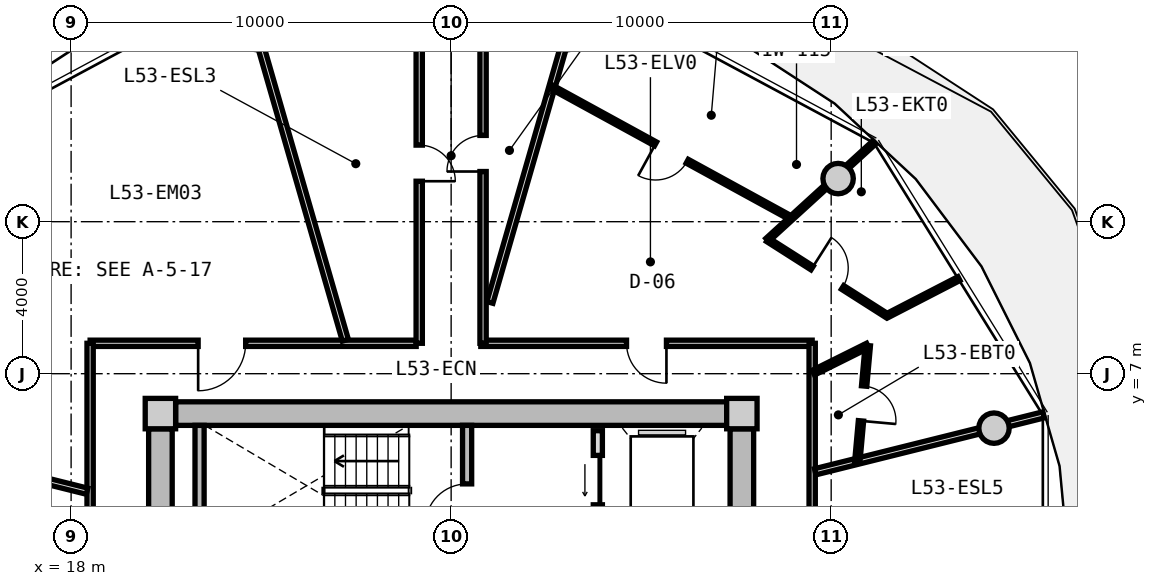
"""IFC4 building model, lengths in metres.
Left out: names, types, materials, properties, quantities, classifications, styles, units other than length and angle.
Written with IfcOpenShell. Run it as: python <this file> out.ifc"""

import sys

from ifc_helpers import new_model, si_unit, direction, frame, frame_2d, origin, origin_2d, place, context, subcontext, project, spatial, rectangle, circle, extrude, source, transform, mapped, element, fill, save


model = new_model("IFC4")
c1 = context("Model", 3, precision=1e-05, world=origin(), true_north=direction((0.0, 1.0)))
c2 = subcontext(c1, "Body", "Model", "MODEL_VIEW")
j1 = project(units=[si_unit("LENGTHUNIT", "METRE"), si_unit("PLANEANGLEUNIT", "RADIAN")], contexts=[c1])
p1 = place(None, origin())
s1 = spatial("IfcSite", under=j1, at=p1, CompositionType="ELEMENT")
p2 = place(p1, origin())
s2 = spatial("IfcBuilding", under=s1, at=p2, CompositionType="ELEMENT")
p3 = place(p2, frame((0.0, 0.0, 170.9)))
s3 = spatial("IfcBuildingStorey", under=s2, at=p3, CompositionType="ELEMENT", Elevation=170.9)
m1 = source(origin(), c2, "Body", "SweptSolid", [
    extrude(rectangle(XDim=0.8, YDim=0.8, at=origin_2d()), origin(), (0.0, 0.0, 1.0), 3.05),
])
for number, where, z_axis, x_axis in (
    (1, (35.65, 5.95, 0.0), (0.0, 0.0, 1.0), (1.0, 0.0, 0.0)),
    (2, (20.35, 5.95, 0.0), (0.0, 0.0, 1.0), (1.0, 0.0, 0.0)),
):
    element("IfcColumn", number, at=place(p3, frame(where, z_axis=z_axis, x_axis=x_axis)), inside=s3, PredefinedType="COLUMN", context=c2, shape_type="MappedRepresentation", body=[
        mapped(m1, transform((0.0, 0.0, 0.0), x_axis=(1.0, 0.0, 0.0), y_axis=(0.0, 1.0, 0.0), z_axis=(0.0, 0.0, 1.0), scale=1.0)),
    ])
m2 = source(origin(), c2, "Body", "SweptSolid", [
    extrude(rectangle(XDim=14.5, YDim=0.62, at=frame_2d((7.25, 0.0))), origin(), (0.0, 0.0, 1.0), 2.81),
])
p4 = place(p3, frame((20.75, 5.95, 0.0), z_axis=(0.0, 0.0, 1.0), x_axis=(1.0, 0.0, 0.0)))
e3 = element("IfcWall", 3, at=p4, inside=s3, PredefinedType="SHEAR", context=c2, shape_type="MappedRepresentation", body=[
    mapped(m2, transform((0.0, 0.0, 0.0), x_axis=(1.0, 0.0, 0.0), y_axis=(0.0, 1.0, 0.0), z_axis=(0.0, 0.0, 1.0), scale=1.0)),
])
m3 = source(origin(), c2, "Body", "SweptSolid", [
    extrude(rectangle(XDim=11.1, YDim=0.62, at=frame_2d((5.55, 0.0))), origin(), (0.0, 0.0, 1.0), 2.81),
])
p5 = place(p3, frame((20.35, -5.55, 0.0), z_axis=(0.0, 0.0, 1.0), x_axis=(0.0, 1.0, 0.0)))
e4 = element("IfcWall", 4, at=p5, inside=s3, PredefinedType="SHEAR", context=c2, shape_type="MappedRepresentation", body=[
    mapped(m3, transform((0.0, 0.0, 0.0), x_axis=(1.0, 0.0, 0.0), y_axis=(0.0, 1.0, 0.0), z_axis=(0.0, 0.0, 1.0), scale=1.0)),
])
p6 = place(p5, frame((3.8, 0.0, 0.0)))
e5 = element("IfcOpeningElement", 5, at=p6, cuts=e4, PredefinedType="OPENING", context=c2, shape_type="SweptSolid", body=[
    extrude(rectangle(XDim=1.2, YDim=2.15, at=frame_2d((0.6, 1.075))), frame((0.0, 0.32, 0.0), z_axis=(0.0, -1.0, 0.0), x_axis=(1.0, 0.0, 0.0)), (0.0, 0.0, 1.0), 0.64),
])
p7 = place(p3, frame((35.65, 5.55, 0.0), z_axis=(0.0, 0.0, 1.0), x_axis=(0.0, -1.0, 0.0)))
e6 = element("IfcWall", 6, at=p7, inside=s3, PredefinedType="SHEAR", context=c2, shape_type="MappedRepresentation", body=[
    mapped(m3, transform((0.0, 0.0, 0.0), x_axis=(1.0, 0.0, 0.0), y_axis=(0.0, 1.0, 0.0), z_axis=(0.0, 0.0, 1.0), scale=1.0)),
])
p8 = place(p7, frame((5.65, 0.0, 0.0)))
e7 = element("IfcOpeningElement", 7, at=p8, cuts=e6, PredefinedType="OPENING", context=c2, shape_type="SweptSolid", body=[
    extrude(rectangle(XDim=1.2, YDim=2.15, at=frame_2d((0.6, 1.075))), frame((0.0, 0.32, 0.0), z_axis=(0.0, -1.0, 0.0), x_axis=(1.0, 0.0, 0.0)), (0.0, 0.0, 1.0), 0.64),
])
p9 = place(p7, frame((9.3, 0.0, 0.0)))
e8 = element("IfcOpeningElement", 8, at=p9, cuts=e6, PredefinedType="OPENING", context=c2, shape_type="SweptSolid", body=[
    extrude(rectangle(XDim=1.0, YDim=2.1, at=frame_2d((0.5, 1.05))), frame((0.0, 0.32, 0.0), z_axis=(0.0, -1.0, 0.0), x_axis=(1.0, 0.0, 0.0)), (0.0, 0.0, 1.0), 0.64),
])
m4 = source(origin(), c2, "Body", "SweptSolid", [
    extrude(circle(Radius=0.4, at=origin_2d()), origin(), (0.0, 0.0, 1.0), 3.05),
])
for number, where, z_axis, x_axis in (
    (9, (42.285, 5.567, 0.0), (0.0, 0.0, 1.0), (1.0, 0.0, 0.0)),
    (10, (38.183, 12.135, 0.0), (0.0, 0.0, 1.0), (1.0, 0.0, 0.0)),
):
    element("IfcColumn", number, at=place(p3, frame(where, z_axis=z_axis, x_axis=x_axis)), inside=s3, PredefinedType="COLUMN", context=c2, shape_type="MappedRepresentation", body=[
        mapped(m4, transform((0.0, 0.0, 0.0), x_axis=(1.0, 0.0, 0.0), y_axis=(0.0, 1.0, 0.0), z_axis=(0.0, 0.0, 1.0), scale=1.0)),
    ])
m5 = source(origin(), c2, "Body", "SweptSolid", [
    extrude(rectangle(XDim=3.19, YDim=0.24, at=frame_2d((1.595, 0.0))), origin(), (0.0, 0.0, 1.0), 2.81),
])
p10 = place(p3, frame((21.38, 2.45, 0.0), z_axis=(0.0, 0.0, 1.0), x_axis=(0.0, 1.0, 0.0)))
e11 = element("IfcWall", 11, at=p10, inside=s3, PredefinedType="PARTITIONING", context=c2, shape_type="MappedRepresentation", body=[
    mapped(m5, transform((0.0, 0.0, 0.0), x_axis=(1.0, 0.0, 0.0), y_axis=(0.0, 1.0, 0.0), z_axis=(0.0, 0.0, 1.0), scale=1.0)),
])
p11 = place(p3, frame((28.42, 2.45, 0.0), z_axis=(0.0, 0.0, 1.0), x_axis=(0.0, 1.0, 0.0)))
e12 = element("IfcWall", 12, at=p11, inside=s3, PredefinedType="PARTITIONING", context=c2, shape_type="MappedRepresentation", body=[
    mapped(m5, transform((0.0, 0.0, 0.0), x_axis=(1.0, 0.0, 0.0), y_axis=(0.0, 1.0, 0.0), z_axis=(0.0, 0.0, 1.0), scale=1.0)),
])
p12 = place(p11, frame((0.55, 0.0, 0.0)))
e13 = element("IfcOpeningElement", 13, at=p12, cuts=e12, PredefinedType="OPENING", context=c2, shape_type="SweptSolid", body=[
    extrude(rectangle(XDim=1.1, YDim=2.15, at=frame_2d((0.55, 1.075))), frame((0.0, 0.13, 0.0), z_axis=(0.0, -1.0, 0.0), x_axis=(1.0, 0.0, 0.0)), (0.0, 0.0, 1.0), 0.26),
])
m6 = source(origin(), c2, "Body", "SweptSolid", [
    extrude(rectangle(XDim=5.0, YDim=0.24, at=frame_2d((2.5, 0.0))), origin(), (0.0, 0.0, 1.0), 2.795),
])
p13 = place(p3, frame((31.86, 0.5, 0.0), z_axis=(0.0, 0.0, 1.0), x_axis=(0.0, 1.0, 0.0)))
e14 = element("IfcWall", 14, at=p13, inside=s3, PredefinedType="PARTITIONING", context=c2, shape_type="MappedRepresentation", body=[
    mapped(m6, transform((0.0, 0.0, 0.0), x_axis=(1.0, 0.0, 0.0), y_axis=(0.0, 1.0, 0.0), z_axis=(0.0, 0.0, 1.0), scale=1.0)),
])
p14 = place(p13, frame((3.05, 0.0, 0.0)))
e15 = element("IfcOpeningElement", 15, at=p14, cuts=e14, PredefinedType="OPENING", context=c2, shape_type="SweptSolid", body=[
    extrude(rectangle(XDim=1.3, YDim=2.2, at=frame_2d((0.65, 1.1))), frame((0.0, 0.13, 0.0), z_axis=(0.0, -1.0, 0.0), x_axis=(1.0, 0.0, 0.0)), (0.0, 0.0, 1.0), 0.26),
])
p15 = place(p13, frame((0.55, 0.0, 0.0)))
e16 = element("IfcOpeningElement", 16, at=p15, cuts=e14, PredefinedType="OPENING", context=c2, shape_type="SweptSolid", body=[
    extrude(rectangle(XDim=1.3, YDim=2.2, at=frame_2d((0.65, 1.1))), frame((0.0, 0.13, 0.0), z_axis=(0.0, -1.0, 0.0), x_axis=(1.0, 0.0, 0.0)), (0.0, 0.0, 1.0), 0.26),
])
m7 = source(origin(), c2, "Body", "SweptSolid", [
    extrude(rectangle(XDim=8.58, YDim=0.165, at=frame_2d((4.29, 0.0))), origin(), (0.0, 0.0, 1.0), 2.795),
])
p16 = place(p3, frame((18.5, 7.8, 0.0), z_axis=(0.0, 0.0, 1.0), x_axis=(1.0, 0.0, 0.0)))
e17 = element("IfcWall", 17, at=p16, inside=s3, PredefinedType="PARTITIONING", context=c2, shape_type="MappedRepresentation", body=[
    mapped(m7, transform((0.0, 0.0, 0.0), x_axis=(1.0, 0.0, 0.0), y_axis=(0.0, 1.0, 0.0), z_axis=(0.0, 0.0, 1.0), scale=1.0)),
])
p17 = place(p16, frame((2.843, 0.0, 0.0)))
e18 = element("IfcOpeningElement", 18, at=p17, cuts=e17, PredefinedType="OPENING", context=c2, shape_type="SweptSolid", body=[
    extrude(rectangle(XDim=1.25, YDim=2.2, at=frame_2d((0.625, 1.1))), frame((0.0, 0.093, 0.0), z_axis=(0.0, -1.0, 0.0), x_axis=(1.0, 0.0, 0.0)), (0.0, 0.0, 1.0), 0.185),
])
m8 = source(origin(), c2, "Body", "SweptSolid", [
    extrude(rectangle(XDim=8.719, YDim=0.165, at=frame_2d((4.36, 0.0))), origin(), (0.0, 0.0, 1.0), 2.795),
])
p18 = place(p3, frame((28.781, 7.8, 0.0), z_axis=(0.0, 0.0, 1.0), x_axis=(1.0, 0.0, 0.0)))
e19 = element("IfcWall", 19, at=p18, inside=s3, PredefinedType="PARTITIONING", context=c2, shape_type="MappedRepresentation", body=[
    mapped(m8, transform((0.0, 0.0, 0.0), x_axis=(1.0, 0.0, 0.0), y_axis=(0.0, 1.0, 0.0), z_axis=(0.0, 0.0, 1.0), scale=1.0)),
])
p19 = place(p18, frame((3.835, 0.0, 0.0)))
e20 = element("IfcOpeningElement", 20, at=p19, cuts=e19, PredefinedType="OPENING", context=c2, shape_type="SweptSolid", body=[
    extrude(rectangle(XDim=1.05, YDim=2.15, at=frame_2d((0.525, 1.075))), frame((0.0, 0.093, 0.0), z_axis=(0.0, -1.0, 0.0), x_axis=(1.0, 0.0, 0.0)), (0.0, 0.0, 1.0), 0.185),
])
m9 = source(origin(), c2, "Body", "SweptSolid", [
    extrude(rectangle(XDim=6.88, YDim=0.165, at=frame_2d((3.44, 0.0))), origin(), (0.0, 0.0, 1.0), 2.795),
])
for number, where, z_axis, x_axis in (
    (21, (18.5, 0.92, 0.0), (0.0, 0.0, 1.0), (0.0, 1.0, 0.0)),
    (22, (37.5, 7.8, 0.0), (0.0, 0.0, 1.0), (0.0, -1.0, 0.0)),
):
    element("IfcWall", number, at=place(p3, frame(where, z_axis=z_axis, x_axis=x_axis)), inside=s3, PredefinedType="PARTITIONING", context=c2, shape_type="MappedRepresentation", body=[
        mapped(m9, transform((0.0, 0.0, 0.0), x_axis=(1.0, 0.0, 0.0), y_axis=(0.0, 1.0, 0.0), z_axis=(0.0, 0.0, 1.0), scale=1.0)),
    ])
m10 = source(origin(), c2, "Body", "SweptSolid", [
    extrude(rectangle(XDim=8.695, YDim=0.165, at=frame_2d((4.348, 0.0))), origin(), (0.0, 0.0, 1.0), 2.345),
])
p20 = place(p3, frame((29.02, 8.875, 0.0), z_axis=(0.0, 0.0, 1.0), x_axis=(0.276797231892, 0.960928349263, 0.0)))
e23 = element("IfcWall", 23, at=p20, inside=s3, PredefinedType="PARTITIONING", context=c2, shape_type="MappedRepresentation", body=[
    mapped(m10, transform((0.0, 0.0, 0.0), x_axis=(1.0, 0.0, 0.0), y_axis=(0.0, 1.0, 0.0), z_axis=(0.0, 0.0, 1.0), scale=1.0)),
])
m11 = source(origin(), c2, "Body", "SweptSolid", [
    extrude(rectangle(XDim=9.73, YDim=0.165, at=frame_2d((4.865, 0.0))), origin(), (0.0, 0.0, 1.0), 2.345),
])
p21 = place(p3, frame((25.217, 7.88, 0.0), z_axis=(0.0, 0.0, 1.0), x_axis=(-0.27679492614, 0.960929013436, 0.0)))
e24 = element("IfcWall", 24, at=p21, inside=s3, PredefinedType="PARTITIONING", context=c2, shape_type="MappedRepresentation", body=[
    mapped(m11, transform((0.0, 0.0, 0.0), x_axis=(1.0, 0.0, 0.0), y_axis=(0.0, 1.0, 0.0), z_axis=(0.0, 0.0, 1.0), scale=1.0)),
])
m12 = source(origin(), c2, "Body", "SweptSolid", [
    extrude(rectangle(XDim=8.305, YDim=0.165, at=frame_2d((4.153, 0.0))), origin(), (0.0, 0.0, 1.0), 2.345),
])
p22 = place(p3, frame((18.42, 3.908, 0.0), z_axis=(0.0, 0.0, 1.0), x_axis=(-0.970309994378, 0.241864662175, 0.0)))
e25 = element("IfcWall", 25, at=p22, inside=s3, PredefinedType="PARTITIONING", context=c2, shape_type="MappedRepresentation", body=[
    mapped(m12, transform((0.0, 0.0, 0.0), x_axis=(1.0, 0.0, 0.0), y_axis=(0.0, 1.0, 0.0), z_axis=(0.0, 0.0, 1.0), scale=1.0)),
])
m13 = source(origin(), c2, "Body", "SweptSolid", [
    extrude(rectangle(XDim=6.193, YDim=0.165, at=frame_2d((3.096, 0.0))), origin(), (0.0, 0.0, 1.0), 2.345),
])
p23 = place(p3, frame((37.58, 4.419, 0.0), z_axis=(0.0, 0.0, 1.0), x_axis=(0.970309243466, 0.241867674657, 0.0)))
e26 = element("IfcWall", 26, at=p23, inside=s3, PredefinedType="PARTITIONING", context=c2, shape_type="MappedRepresentation", body=[
    mapped(m13, transform((0.0, 0.0, 0.0), x_axis=(1.0, 0.0, 0.0), y_axis=(0.0, 1.0, 0.0), z_axis=(0.0, 0.0, 1.0), scale=1.0)),
])
m14 = source(origin(), c2, "Body", "SweptSolid", [
    extrude(rectangle(XDim=9.48, YDim=0.165, at=frame_2d((4.74, 0.0))), origin(), (0.0, 0.0, 1.0), 2.795),
])
p24 = place(p3, frame((27.16, 7.8, 0.0), z_axis=(0.0, 0.0, 1.0), x_axis=(0.0, 1.0, 0.0)))
e27 = element("IfcWall", 27, at=p24, inside=s3, PredefinedType="PARTITIONING", context=c2, shape_type="MappedRepresentation", body=[
    mapped(m14, transform((0.0, 0.0, 0.0), x_axis=(1.0, 0.0, 0.0), y_axis=(0.0, 1.0, 0.0), z_axis=(0.0, 0.0, 1.0), scale=1.0)),
])
p25 = place(p24, frame((4.265, 0.0, 0.0)))
e28 = element("IfcOpeningElement", 28, at=p25, cuts=e27, PredefinedType="OPENING", context=c2, shape_type="SweptSolid", body=[
    extrude(rectangle(XDim=0.95, YDim=2.1, at=frame_2d((0.475, 1.05))), frame((0.0, 0.093, 0.0), z_axis=(0.0, -1.0, 0.0), x_axis=(1.0, 0.0, 0.0)), (0.0, 0.0, 1.0), 0.185),
])
p26 = place(p3, frame((28.84, 17.28, 0.0), z_axis=(0.0, 0.0, 1.0), x_axis=(0.0, -1.0, 0.0)))
e29 = element("IfcWall", 29, at=p26, inside=s3, PredefinedType="PARTITIONING", context=c2, shape_type="MappedRepresentation", body=[
    mapped(m14, transform((0.0, 0.0, 0.0), x_axis=(1.0, 0.0, 0.0), y_axis=(0.0, 1.0, 0.0), z_axis=(0.0, 0.0, 1.0), scale=1.0)),
])
p27 = place(p26, frame((4.01, 0.0, 0.0)))
e30 = element("IfcOpeningElement", 30, at=p27, cuts=e29, PredefinedType="OPENING", context=c2, shape_type="SweptSolid", body=[
    extrude(rectangle(XDim=0.95, YDim=2.1, at=frame_2d((0.475, 1.05))), frame((0.0, 0.093, 0.0), z_axis=(0.0, -1.0, 0.0), x_axis=(1.0, 0.0, 0.0)), (0.0, 0.0, 1.0), 0.185),
])
m15 = source(origin(), c2, "Body", "SweptSolid", [
    extrude(rectangle(XDim=7.167, YDim=0.115, at=frame_2d((3.583, 0.0))), origin(), (0.0, 0.0, 1.0), 2.795),
])
p28 = place(p3, frame((36.939, 11.098, 0.0), z_axis=(0.0, 0.0, 1.0), x_axis=(-0.8771628907, 0.480192943699, 0.0)))
e31 = element("IfcWall", 31, at=p28, inside=s3, PredefinedType="PARTITIONING", context=c2, shape_type="MappedRepresentation", body=[
    mapped(m15, transform((0.0, 0.0, 0.0), x_axis=(1.0, 0.0, 0.0), y_axis=(0.0, 1.0, 0.0), z_axis=(0.0, 0.0, 1.0), scale=1.0)),
])
p29 = place(p28, frame((3.108, 0.0, 0.0)))
e32 = element("IfcOpeningElement", 32, at=p29, cuts=e31, PredefinedType="OPENING", context=c2, shape_type="SweptSolid", body=[
    extrude(rectangle(XDim=0.95, YDim=2.1, at=frame_2d((0.475, 1.05))), frame((0.0, 0.067, 0.0), z_axis=(0.0, -1.0, 0.0), x_axis=(1.0, 0.0, 0.0)), (0.0, 0.0, 1.0), 0.135),
])
m16 = source(origin(), c2, "Body", "SweptSolid", [
    extrude(rectangle(XDim=3.814, YDim=0.115, at=frame_2d((1.907, 0.0))), origin(), (0.0, 0.0, 1.0), 2.345),
])
p30 = place(p3, frame((36.319, 10.518, 0.0), z_axis=(0.0, 0.0, 1.0), x_axis=(0.73871962024, 0.674012850524, 0.0)))
e33 = element("IfcWall", 33, at=p30, inside=s3, PredefinedType="PARTITIONING", context=c2, shape_type="MappedRepresentation", body=[
    mapped(m16, transform((0.0, 0.0, 0.0), x_axis=(1.0, 0.0, 0.0), y_axis=(0.0, 1.0, 0.0), z_axis=(0.0, 0.0, 1.0), scale=1.0)),
])
m17 = source(origin(), c2, "Body", "SweptSolid", [
    extrude(rectangle(XDim=1.601, YDim=0.14, at=frame_2d((0.801, 0.0))), origin(), (0.0, 0.0, 1.0), 2.795),
])
p31 = place(p3, frame((37.53, 7.026, 0.0), z_axis=(0.0, 0.0, 1.0), x_axis=(0.895279369592, 0.445505163138, 0.0)))
e34 = element("IfcWall", 34, at=p31, inside=s3, PredefinedType="PARTITIONING", context=c2, shape_type="MappedRepresentation", body=[
    mapped(m17, transform((0.0, 0.0, 0.0), x_axis=(1.0, 0.0, 0.0), y_axis=(0.0, 1.0, 0.0), z_axis=(0.0, 0.0, 1.0), scale=1.0)),
])
m18 = source(origin(), c2, "Body", "SweptSolid", [
    extrude(rectangle(XDim=3.058, YDim=0.14, at=frame_2d((1.529, 0.0))), origin(), (0.0, 0.0, 1.0), 2.795),
])
p32 = place(p3, frame((38.964, 7.74, 0.0), z_axis=(0.0, 0.0, 1.0), x_axis=(-0.090060616512, -0.99593628579, 0.0)))
e35 = element("IfcWall", 35, at=p32, inside=s3, PredefinedType="PARTITIONING", context=c2, shape_type="MappedRepresentation", body=[
    mapped(m18, transform((0.0, 0.0, 0.0), x_axis=(1.0, 0.0, 0.0), y_axis=(0.0, 1.0, 0.0), z_axis=(0.0, 0.0, 1.0), scale=1.0)),
])
p33 = place(p32, frame((1.069, 0.0, 0.0)))
e36 = element("IfcOpeningElement", 36, at=p33, cuts=e35, PredefinedType="OPENING", context=c2, shape_type="SweptSolid", body=[
    extrude(rectangle(XDim=0.92, YDim=2.1, at=frame_2d((0.46, 1.05))), frame((0.0, 0.08, 0.0), z_axis=(0.0, -1.0, 0.0), x_axis=(1.0, 0.0, 0.0)), (0.0, 0.0, 1.0), 0.16),
])
m19 = source(origin(), c2, "Body", "SweptSolid", [
    extrude(rectangle(XDim=2.13, YDim=0.115, at=frame_2d((1.065, 0.0))), origin(), (0.0, 0.0, 1.0), 2.795),
])
p34 = place(p3, frame((39.471, 8.525, 0.0), z_axis=(0.0, 0.0, 1.0), x_axis=(0.888504584778, 0.458867740016, 0.0)))
e37 = element("IfcWall", 37, at=p34, inside=s3, PredefinedType="PARTITIONING", context=c2, shape_type="MappedRepresentation", body=[
    mapped(m19, transform((0.0, 0.0, 0.0), x_axis=(1.0, 0.0, 0.0), y_axis=(0.0, 1.0, 0.0), z_axis=(0.0, 0.0, 1.0), scale=1.0)),
])
m20 = source(origin(), c2, "Body", "SweptSolid", [
    extrude(rectangle(XDim=3.725, YDim=0.115, at=frame_2d((1.863, 0.0))), origin(), (0.0, 0.0, 1.0), 2.795),
])
p35 = place(p3, frame((39.471, 8.525, 0.0), z_axis=(0.0, 0.0, 1.0), x_axis=(-0.843453635564, 0.537201977523, 0.0)))
e38 = element("IfcWall", 38, at=p35, inside=s3, PredefinedType="PARTITIONING", context=c2, shape_type="MappedRepresentation", body=[
    mapped(m20, transform((0.0, 0.0, 0.0), x_axis=(1.0, 0.0, 0.0), y_axis=(0.0, 1.0, 0.0), z_axis=(0.0, 0.0, 1.0), scale=1.0)),
])
p36 = place(p35, frame((1.388, 0.0, 0.0)))
e39 = element("IfcOpeningElement", 39, at=p36, cuts=e38, PredefinedType="OPENING", context=c2, shape_type="SweptSolid", body=[
    extrude(rectangle(XDim=0.95, YDim=2.1, at=frame_2d((0.475, 1.05))), frame((0.0, 0.067, 0.0), z_axis=(0.0, -1.0, 0.0), x_axis=(1.0, 0.0, 0.0)), (0.0, 0.0, 1.0), 0.135),
])
m21 = source(origin(), c2, "Body", "SweptSolid", [
    extrude(rectangle(XDim=1.1, YDim=2.15, at=frame_2d((0.55, 1.075))), frame((0.0, 0.025, 0.0), z_axis=(0.0, -1.0, 0.0), x_axis=(1.0, 0.0, 0.0)), (0.0, 0.0, 1.0), 0.05),
])
p37 = place(p12, origin())
e40 = element("IfcDoor", 40, at=p37, inside=s3, OperationType="SINGLE_SWING_LEFT", PredefinedType="DOOR", context=c2, shape_type="MappedRepresentation", body=[
    mapped(m21, transform((0.0, 0.0, 0.0), x_axis=(1.0, 0.0, 0.0), y_axis=(0.0, 1.0, 0.0), z_axis=(0.0, 0.0, 1.0), scale=1.0)),
])
fill(e13, e40)
m22 = source(origin(), c2, "Body", "SweptSolid", [
    extrude(rectangle(XDim=1.3, YDim=2.2, at=frame_2d((0.65, 1.1))), frame((0.0, 0.025, 0.0), z_axis=(0.0, -1.0, 0.0), x_axis=(1.0, 0.0, 0.0)), (0.0, 0.0, 1.0), 0.05),
])
p38 = place(p14, origin())
e41 = element("IfcDoor", 41, at=p38, inside=s3, OperationType="SLIDING_TO_LEFT", PredefinedType="DOOR", context=c2, shape_type="MappedRepresentation", body=[
    mapped(m22, transform((0.0, 0.0, 0.0), x_axis=(1.0, 0.0, 0.0), y_axis=(0.0, 1.0, 0.0), z_axis=(0.0, 0.0, 1.0), scale=1.0)),
])
fill(e15, e41)
m23 = source(origin(), c2, "Body", "SweptSolid", [
    extrude(rectangle(XDim=0.95, YDim=2.1, at=frame_2d((0.475, 1.05))), frame((0.0, 0.025, 0.0), z_axis=(0.0, -1.0, 0.0), x_axis=(1.0, 0.0, 0.0)), (0.0, 0.0, 1.0), 0.05),
])
p39 = place(p25, frame((0.95, 0.0, 0.0), z_axis=(0.0, 0.0, 1.0), x_axis=(-1.0, 0.0, 0.0)))
e42 = element("IfcDoor", 42, at=p39, inside=s3, OperationType="SINGLE_SWING_RIGHT", PredefinedType="DOOR", context=c2, shape_type="MappedRepresentation", body=[
    mapped(m23, transform((0.0, 0.0, 0.0), x_axis=(1.0, 0.0, 0.0), y_axis=(0.0, 1.0, 0.0), z_axis=(0.0, 0.0, 1.0), scale=1.0)),
])
fill(e28, e42)
p40 = place(p27, frame((0.95, 0.0, 0.0), z_axis=(0.0, 0.0, 1.0), x_axis=(-1.0, 0.0, 0.0)))
e43 = element("IfcDoor", 43, at=p40, inside=s3, OperationType="SINGLE_SWING_LEFT", PredefinedType="DOOR", context=c2, shape_type="MappedRepresentation", body=[
    mapped(m23, transform((0.0, 0.0, 0.0), x_axis=(1.0, 0.0, 0.0), y_axis=(0.0, 1.0, 0.0), z_axis=(0.0, 0.0, 1.0), scale=1.0)),
])
fill(e30, e43)
m24 = source(origin(), c2, "Body", "SweptSolid", [
    extrude(rectangle(XDim=1.05, YDim=2.15, at=frame_2d((0.525, 1.075))), frame((0.0, 0.025, 0.0), z_axis=(0.0, -1.0, 0.0), x_axis=(1.0, 0.0, 0.0)), (0.0, 0.0, 1.0), 0.05),
])
p41 = place(p19, frame((1.05, 0.0, 0.0), z_axis=(0.0, 0.0, 1.0), x_axis=(-1.0, 0.0, 0.0)))
e44 = element("IfcDoor", 44, at=p41, inside=s3, OperationType="SINGLE_SWING_LEFT", PredefinedType="DOOR", context=c2, shape_type="MappedRepresentation", body=[
    mapped(m24, transform((0.0, 0.0, 0.0), x_axis=(1.0, 0.0, 0.0), y_axis=(0.0, 1.0, 0.0), z_axis=(0.0, 0.0, 1.0), scale=1.0)),
])
fill(e20, e44)
m25 = source(origin(), c2, "Body", "SweptSolid", [
    extrude(rectangle(XDim=0.92, YDim=2.1, at=frame_2d((0.46, 1.05))), frame((0.0, 0.025, 0.0), z_axis=(0.0, -1.0, 0.0), x_axis=(1.0, 0.0, 0.0)), (0.0, 0.0, 1.0), 0.05),
])
p42 = place(p33, origin())
e45 = element("IfcDoor", 45, at=p42, inside=s3, OperationType="SINGLE_SWING_RIGHT", PredefinedType="DOOR", context=c2, shape_type="MappedRepresentation", body=[
    mapped(m25, transform((0.0, 0.0, 0.0), x_axis=(1.0, 0.0, 0.0), y_axis=(0.0, 1.0, 0.0), z_axis=(0.0, 0.0, 1.0), scale=1.0)),
])
fill(e36, e45)
p43 = place(p36, frame((0.95, 0.0, 0.0), z_axis=(0.0, 0.0, 1.0), x_axis=(-1.0, 0.0, 0.0)))
e46 = element("IfcDoor", 46, at=p43, inside=s3, OperationType="SINGLE_SWING_LEFT", PredefinedType="DOOR", context=c2, shape_type="MappedRepresentation", body=[
    mapped(m23, transform((0.0, 0.0, 0.0), x_axis=(1.0, 0.0, 0.0), y_axis=(0.0, 1.0, 0.0), z_axis=(0.0, 0.0, 1.0), scale=1.0)),
])
fill(e39, e46)
p44 = place(p29, origin())
e47 = element("IfcDoor", 47, at=p44, inside=s3, OperationType="SINGLE_SWING_RIGHT", PredefinedType="DOOR", context=c2, shape_type="MappedRepresentation", body=[
    mapped(m23, transform((0.0, 0.0, 0.0), x_axis=(1.0, 0.0, 0.0), y_axis=(0.0, 1.0, 0.0), z_axis=(0.0, 0.0, 1.0), scale=1.0)),
])
fill(e32, e47)
m26 = source(origin(), c2, "Body", "SweptSolid", [
    extrude(rectangle(XDim=1.25, YDim=2.2, at=frame_2d((0.625, 1.1))), frame((0.0, 0.025, 0.0), z_axis=(0.0, -1.0, 0.0), x_axis=(1.0, 0.0, 0.0)), (0.0, 0.0, 1.0), 0.05),
])
p45 = place(p17, frame((1.25, 0.0, 0.0), z_axis=(0.0, 0.0, 1.0), x_axis=(-1.0, 0.0, 0.0)))
e48 = element("IfcDoor", 48, at=p45, inside=s3, OperationType="SINGLE_SWING_RIGHT", PredefinedType="DOOR", context=c2, shape_type="MappedRepresentation", body=[
    mapped(m26, transform((0.0, 0.0, 0.0), x_axis=(1.0, 0.0, 0.0), y_axis=(0.0, 1.0, 0.0), z_axis=(0.0, 0.0, 1.0), scale=1.0)),
])
fill(e18, e48)
save(model, sys.argv[1])
